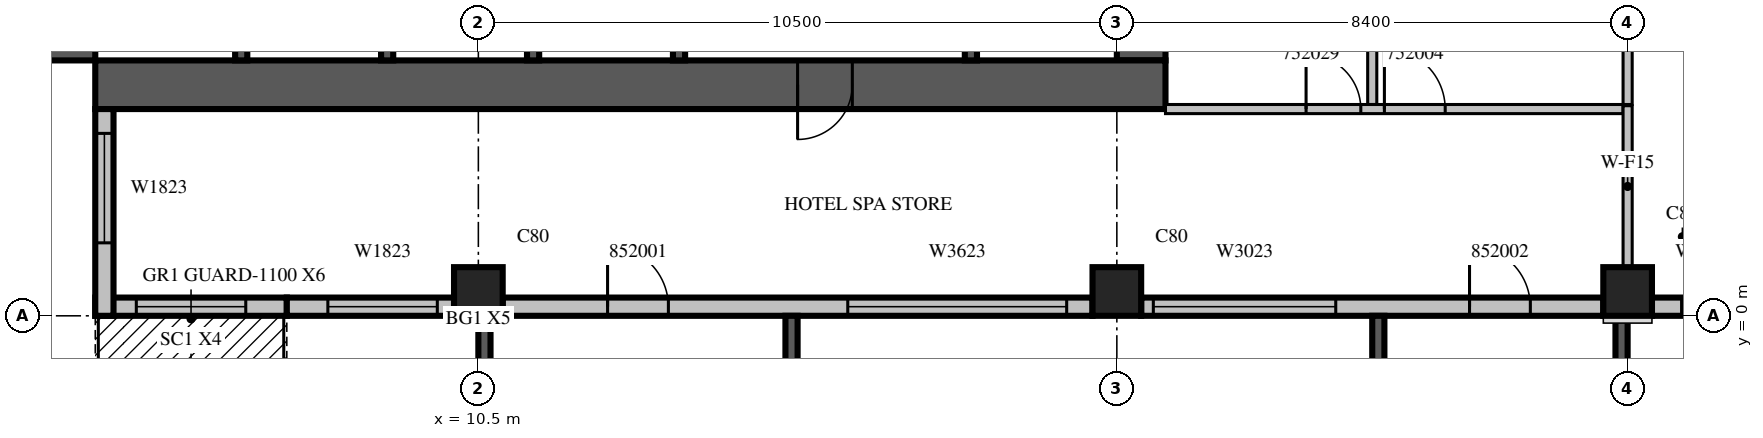
"""IFC4 building model, lengths in metres.
Left out: names, types, materials, properties, quantities, classifications, styles, units other than length and angle.
Written with IfcOpenShell. Run it as: python <this file> out.ifc"""

import sys

from ifc_helpers import new_model, si_unit, direction, frame, frame_2d, origin, origin_2d, place, context, subcontext, project, spatial, rectangle, extrude, source, transform, mapped, element, fill, save


model = new_model("IFC4")
c1 = context("Model", 3, precision=1e-05, world=origin(), true_north=direction((0.0, 1.0)))
c2 = subcontext(c1, "Body", "Model", "MODEL_VIEW")
j1 = project(units=[si_unit("LENGTHUNIT", "METRE"), si_unit("PLANEANGLEUNIT", "RADIAN")], contexts=[c1])
p1 = place(None, origin())
s1 = spatial("IfcSite", under=j1, at=p1, CompositionType="ELEMENT")
p2 = place(p1, origin())
s2 = spatial("IfcBuilding", under=s1, at=p2, CompositionType="ELEMENT")
p3 = place(p2, frame((0.0, 0.0, 231.0)))
s3 = spatial("IfcBuildingStorey", under=s2, at=p3, CompositionType="ELEMENT", Elevation=231.0)
m1 = source(origin(), c2, "Body", "SweptSolid", [
    extrude(rectangle(XDim=0.8, YDim=0.8, at=origin_2d()), origin(), (0.0, 0.0, 1.0), 3.8),
])
for number, where, z_axis, x_axis in (
    (1, (10.5, 0.4, 0.0), (0.0, 0.0, 1.0), (1.0, 0.0, 0.0)),
    (2, (21.0, 0.4, 0.0), (0.0, 0.0, 1.0), (1.0, 0.0, 0.0)),
    (3, (29.4, 0.4, 0.0), (0.0, 0.0, 1.0), (1.0, 0.0, 0.0)),
):
    element("IfcColumn", number, at=place(p3, frame(where, z_axis=z_axis, x_axis=x_axis)), inside=s3, PredefinedType="COLUMN", context=c2, shape_type="MappedRepresentation", body=[
        mapped(m1, transform((0.0, 0.0, 0.0), scale=1.0)),
    ])
m2 = source(origin(), c2, "Body", "SweptSolid", [
    extrude(rectangle(XDim=17.6, YDim=0.8, at=frame_2d((8.8, 0.0))), origin(), (0.0, 0.0, 1.0), 3.8),
])
p4 = place(p3, frame((3.8, 4.2, 0.0), z_axis=(0.0, 0.0, 1.0), x_axis=(0.0, 1.0, 0.0)))
e4 = element("IfcWall", 4, at=p4, inside=s3, PredefinedType="SHEAR", context=c2, shape_type="MappedRepresentation", body=[
    mapped(m2, transform((0.0, 0.0, 0.0), scale=1.0)),
])
m3 = source(origin(), c2, "Body", "SweptSolid", [
    extrude(rectangle(XDim=2.2, YDim=2.1, at=frame_2d((1.1, 1.05))), frame((0.0, 0.41, 0.0), z_axis=(0.0, -1.0, 0.0), x_axis=(1.0, 0.0, 0.0)), (0.0, 0.0, 1.0), 0.82),
])
p5 = place(p4, frame((4.2, 0.0, 0.0)))
e5 = element("IfcOpeningElement", 5, at=p5, cuts=e4, PredefinedType="OPENING", context=c2, shape_type="MappedRepresentation", body=[
    mapped(m3, transform((0.0, 0.0, 0.0), scale=1.0)),
])
m4 = source(origin(), c2, "Body", "SweptSolid", [
    extrude(rectangle(XDim=0.9, YDim=2.1, at=frame_2d((0.45, 1.05))), frame((0.0, 0.41, 0.0), z_axis=(0.0, -1.0, 0.0), x_axis=(1.0, 0.0, 0.0)), (0.0, 0.0, 1.0), 0.82),
])
p6 = place(p4, frame((10.95, 0.0, 0.0)))
e6 = element("IfcOpeningElement", 6, at=p6, cuts=e4, PredefinedType="OPENING", context=c2, shape_type="MappedRepresentation", body=[
    mapped(m4, transform((0.0, 0.0, 0.0), scale=1.0)),
])
m5 = source(origin(), c2, "Body", "SweptSolid", [
    extrude(rectangle(XDim=16.8, YDim=0.8, at=frame_2d((8.4, 0.0))), origin(), (0.0, 0.0, 1.0), 3.8),
])
p7 = place(p3, frame((21.4, 4.2, 0.0), z_axis=(0.0, 0.0, 1.0), x_axis=(0.0, 1.0, 0.0)))
e7 = element("IfcWall", 7, at=p7, inside=s3, PredefinedType="SHEAR", context=c2, shape_type="MappedRepresentation", body=[
    mapped(m5, transform((0.0, 0.0, 0.0), scale=1.0)),
])
p8 = place(p7, frame((4.2, 0.0, 0.0)))
e8 = element("IfcOpeningElement", 8, at=p8, cuts=e7, PredefinedType="OPENING", context=c2, shape_type="MappedRepresentation", body=[
    mapped(m3, transform((0.0, 0.0, 0.0), scale=1.0)),
])
m6 = source(origin(), c2, "Body", "SweptSolid", [
    extrude(rectangle(XDim=1.2, YDim=2.1, at=frame_2d((0.6, 1.05))), frame((0.0, 0.41, 0.0), z_axis=(0.0, -1.0, 0.0), x_axis=(1.0, 0.0, 0.0)), (0.0, 0.0, 1.0), 0.82),
])
p9 = place(p7, frame((14.7, 0.0, 0.0)))
e9 = element("IfcOpeningElement", 9, at=p9, cuts=e7, PredefinedType="OPENING", context=c2, shape_type="MappedRepresentation", body=[
    mapped(m6, transform((0.0, 0.0, 0.0), scale=1.0)),
])
p10 = place(p3, frame((4.2, 3.8, 0.0), z_axis=(0.0, 0.0, 1.0), x_axis=(1.0, 0.0, 0.0)))
e10 = element("IfcWall", 10, at=p10, inside=s3, PredefinedType="SHEAR", context=c2, shape_type="MappedRepresentation", body=[
    mapped(m2, transform((0.0, 0.0, 0.0), scale=1.0)),
])
p11 = place(p10, frame((11.55, 0.0, 0.0)))
e11 = element("IfcOpeningElement", 11, at=p11, cuts=e10, PredefinedType="OPENING", context=c2, shape_type="MappedRepresentation", body=[
    mapped(m4, transform((0.0, 0.0, 0.0), scale=1.0)),
])
m7 = source(origin(), c2, "Body", "SweptSolid", [
    extrude(rectangle(XDim=3.15, YDim=0.3, at=frame_2d((1.575, 0.0))), origin(), (0.0, 0.0, 1.0), 3.4),
])
p12 = place(p3, frame((4.2, 0.15, 0.0), z_axis=(0.0, 0.0, 1.0), x_axis=(1.0, 0.0, 0.0)))
e12 = element("IfcWall", 12, at=p12, inside=s3, PredefinedType="STANDARD", context=c2, shape_type="MappedRepresentation", body=[
    mapped(m7, transform((0.0, 0.0, 0.0), scale=1.0)),
])
m8 = source(origin(), c2, "Body", "SweptSolid", [
    extrude(rectangle(XDim=1.8, YDim=2.4, at=frame_2d((0.9, 1.2))), frame((0.0, 0.16, 0.0), z_axis=(0.0, -1.0, 0.0), x_axis=(1.0, 0.0, 0.0)), (0.0, 0.0, 1.0), 0.32),
])
p13 = place(p12, frame((0.675, 0.0, 0.0)))
e13 = element("IfcOpeningElement", 13, at=p13, cuts=e12, PredefinedType="OPENING", context=c2, shape_type="MappedRepresentation", body=[
    mapped(m8, transform((0.0, 0.0, 0.0), scale=1.0)),
])
p14 = place(p3, frame((7.35, 0.15, 0.0), z_axis=(0.0, 0.0, 1.0), x_axis=(1.0, 0.0, 0.0)))
e14 = element("IfcWall", 14, at=p14, inside=s3, PredefinedType="STANDARD", context=c2, shape_type="SweptSolid", body=[
    extrude(rectangle(XDim=2.75, YDim=0.3, at=frame_2d((1.375, 0.0))), origin(), (0.0, 0.0, 1.0), 3.4),
])
m9 = source(origin(), c2, "Body", "SweptSolid", [
    extrude(rectangle(XDim=1.8, YDim=2.3, at=frame_2d((0.9, 1.15))), frame((0.0, 0.16, 0.0), z_axis=(0.0, -1.0, 0.0), x_axis=(1.0, 0.0, 0.0)), (0.0, 0.0, 1.0), 0.32),
])
p15 = place(p14, frame((0.675, 0.0, 0.6)))
e15 = element("IfcOpeningElement", 15, at=p15, cuts=e14, PredefinedType="OPENING", context=c2, shape_type="MappedRepresentation", body=[
    mapped(m9, transform((0.0, 0.0, 0.0), scale=1.0)),
])
p16 = place(p3, frame((10.9, 0.15, 0.0), z_axis=(0.0, 0.0, 1.0), x_axis=(1.0, 0.0, 0.0)))
e16 = element("IfcWall", 16, at=p16, inside=s3, PredefinedType="STANDARD", context=c2, shape_type="SweptSolid", body=[
    extrude(rectangle(XDim=9.7, YDim=0.3, at=frame_2d((4.85, 0.0))), origin(), (0.0, 0.0, 1.0), 3.4),
])
m10 = source(origin(), c2, "Body", "SweptSolid", [
    extrude(rectangle(XDim=3.6, YDim=2.3, at=frame_2d((1.8, 1.15))), frame((0.0, 0.16, 0.0), z_axis=(0.0, -1.0, 0.0), x_axis=(1.0, 0.0, 0.0)), (0.0, 0.0, 1.0), 0.32),
])
p17 = place(p16, frame((5.675, 0.0, 0.6)))
e17 = element("IfcOpeningElement", 17, at=p17, cuts=e16, PredefinedType="OPENING", context=c2, shape_type="MappedRepresentation", body=[
    mapped(m10, transform((0.0, 0.0, 0.0), scale=1.0)),
])
m11 = source(origin(), c2, "Body", "SweptSolid", [
    extrude(rectangle(XDim=1.0, YDim=2.1, at=frame_2d((0.5, 1.05))), frame((0.0, 0.16, 0.0), z_axis=(0.0, -1.0, 0.0), x_axis=(1.0, 0.0, 0.0)), (0.0, 0.0, 1.0), 0.32),
])
p18 = place(p16, frame((1.725, 0.0, 0.0)))
e18 = element("IfcOpeningElement", 18, at=p18, cuts=e16, PredefinedType="OPENING", context=c2, shape_type="MappedRepresentation", body=[
    mapped(m11, transform((0.0, 0.0, 0.0), scale=1.0)),
])
m12 = source(origin(), c2, "Body", "SweptSolid", [
    extrude(rectangle(XDim=7.6, YDim=0.3, at=frame_2d((3.8, 0.0))), origin(), (0.0, 0.0, 1.0), 3.4),
])
p19 = place(p3, frame((21.4, 0.15, 0.0), z_axis=(0.0, 0.0, 1.0), x_axis=(1.0, 0.0, 0.0)))
e19 = element("IfcWall", 19, at=p19, inside=s3, PredefinedType="STANDARD", context=c2, shape_type="MappedRepresentation", body=[
    mapped(m12, transform((0.0, 0.0, 0.0), scale=1.0)),
])
m13 = source(origin(), c2, "Body", "SweptSolid", [
    extrude(rectangle(XDim=3.0, YDim=2.3, at=frame_2d((1.5, 1.15))), frame((0.0, 0.16, 0.0), z_axis=(0.0, -1.0, 0.0), x_axis=(1.0, 0.0, 0.0)), (0.0, 0.0, 1.0), 0.32),
])
p20 = place(p19, frame((0.2, 0.0, 0.6)))
e20 = element("IfcOpeningElement", 20, at=p20, cuts=e19, PredefinedType="OPENING", context=c2, shape_type="MappedRepresentation", body=[
    mapped(m13, transform((0.0, 0.0, 0.0), scale=1.0)),
])
p21 = place(p19, frame((5.4, 0.0, 0.0)))
e21 = element("IfcOpeningElement", 21, at=p21, cuts=e19, PredefinedType="OPENING", context=c2, shape_type="MappedRepresentation", body=[
    mapped(m11, transform((0.0, 0.0, 0.0), scale=1.0)),
])
p22 = place(p3, frame((29.8, 0.15, 0.0), z_axis=(0.0, 0.0, 1.0), x_axis=(1.0, 0.0, 0.0)))
e22 = element("IfcWall", 22, at=p22, inside=s3, PredefinedType="STANDARD", context=c2, shape_type="MappedRepresentation", body=[
    mapped(m12, transform((0.0, 0.0, 0.0), scale=1.0)),
])
m14 = source(origin(), c2, "Body", "SweptSolid", [
    extrude(rectangle(XDim=1.2, YDim=2.3, at=frame_2d((0.6, 1.15))), frame((0.0, 0.16, 0.0), z_axis=(0.0, -1.0, 0.0), x_axis=(1.0, 0.0, 0.0)), (0.0, 0.0, 1.0), 0.32),
])
p23 = place(p22, frame((0.487, 0.0, 0.6)))
e23 = element("IfcOpeningElement", 23, at=p23, cuts=e22, PredefinedType="OPENING", context=c2, shape_type="MappedRepresentation", body=[
    mapped(m14, transform((0.0, 0.0, 0.0), scale=1.0)),
])
p24 = place(p22, frame((6.013, 0.0, 0.6)))
e24 = element("IfcOpeningElement", 24, at=p24, cuts=e22, PredefinedType="OPENING", context=c2, shape_type="MappedRepresentation", body=[
    mapped(m14, transform((0.0, 0.0, 0.0), scale=1.0)),
])
m15 = source(origin(), c2, "Body", "SweptSolid", [
    extrude(rectangle(XDim=2.4, YDim=2.3, at=frame_2d((1.2, 1.15))), frame((0.0, 0.16, 0.0), z_axis=(0.0, -1.0, 0.0), x_axis=(1.0, 0.0, 0.0)), (0.0, 0.0, 1.0), 0.32),
])
p25 = place(p22, frame((2.65, 0.0, 0.6)))
e25 = element("IfcOpeningElement", 25, at=p25, cuts=e22, PredefinedType="OPENING", context=c2, shape_type="MappedRepresentation", body=[
    mapped(m15, transform((0.0, 0.0, 0.0), scale=1.0)),
])
m16 = source(origin(), c2, "Body", "SweptSolid", [
    extrude(rectangle(XDim=3.4, YDim=0.3, at=frame_2d((1.7, 0.0))), origin(), (0.0, 0.0, 1.0), 3.4),
])
p26 = place(p3, frame((4.35, 3.4, 0.0), z_axis=(0.0, 0.0, 1.0), x_axis=(0.0, -1.0, 0.0)))
e26 = element("IfcWall", 26, at=p26, inside=s3, PredefinedType="STANDARD", context=c2, shape_type="MappedRepresentation", body=[
    mapped(m16, transform((0.0, 0.0, 0.0), scale=1.0)),
])
p27 = place(p26, frame((0.4, 0.0, 0.6)))
e27 = element("IfcOpeningElement", 27, at=p27, cuts=e26, PredefinedType="OPENING", context=c2, shape_type="MappedRepresentation", body=[
    mapped(m9, transform((0.0, 0.0, 0.0), scale=1.0)),
])
m17 = source(origin(), c2, "Body", "SweptSolid", [
    extrude(rectangle(XDim=3.9, YDim=0.2, at=frame_2d((1.95, 0.0))), origin(), (0.0, 0.0, 1.0), 3.39),
])
p28 = place(p3, frame((10.6, 0.0, 0.0), z_axis=(0.0, 0.0, 1.0), x_axis=(0.0, -1.0, 0.0)))
e28 = element("IfcWall", 28, at=p28, inside=s3, PredefinedType="SOLIDWALL", context=c2, shape_type="MappedRepresentation", body=[
    mapped(m17, transform((0.0, 0.0, 0.0), scale=1.0)),
])
m18 = source(origin(), c2, "Body", "SweptSolid", [
    extrude(rectangle(XDim=2.4, YDim=2.3, at=frame_2d((1.2, 1.15))), frame((0.0, 0.11, 0.0), z_axis=(0.0, -1.0, 0.0), x_axis=(1.0, 0.0, 0.0)), (0.0, 0.0, 1.0), 0.22),
])
p29 = place(p28, frame((0.75, 0.0, 0.6)))
e29 = element("IfcOpeningElement", 29, at=p29, cuts=e28, PredefinedType="OPENING", context=c2, shape_type="MappedRepresentation", body=[
    mapped(m18, transform((0.0, 0.0, 0.0), scale=1.0)),
])
p30 = place(p3, frame((15.65, 0.0, 0.0), z_axis=(0.0, 0.0, 1.0), x_axis=(0.0, -1.0, 0.0)))
e30 = element("IfcWall", 30, at=p30, inside=s3, PredefinedType="SOLIDWALL", context=c2, shape_type="MappedRepresentation", body=[
    mapped(m17, transform((0.0, 0.0, 0.0), scale=1.0)),
])
p31 = place(p30, frame((0.75, 0.0, 0.6)))
e31 = element("IfcOpeningElement", 31, at=p31, cuts=e30, PredefinedType="OPENING", context=c2, shape_type="MappedRepresentation", body=[
    mapped(m18, transform((0.0, 0.0, 0.0), scale=1.0)),
])
p32 = place(p3, frame((25.3, 0.0, 0.0), z_axis=(0.0, 0.0, 1.0), x_axis=(0.0, -1.0, 0.0)))
e32 = element("IfcWall", 32, at=p32, inside=s3, PredefinedType="SOLIDWALL", context=c2, shape_type="MappedRepresentation", body=[
    mapped(m17, transform((0.0, 0.0, 0.0), scale=1.0)),
])
p33 = place(p32, frame((0.75, 0.0, 0.6)))
e33 = element("IfcOpeningElement", 33, at=p33, cuts=e32, PredefinedType="OPENING", context=c2, shape_type="MappedRepresentation", body=[
    mapped(m18, transform((0.0, 0.0, 0.0), scale=1.0)),
])
p34 = place(p3, frame((29.3, 0.0, 0.0), z_axis=(0.0, 0.0, 1.0), x_axis=(0.0, -1.0, 0.0)))
e34 = element("IfcWall", 34, at=p34, inside=s3, PredefinedType="SOLIDWALL", context=c2, shape_type="MappedRepresentation", body=[
    mapped(m17, transform((0.0, 0.0, 0.0), scale=1.0)),
])
p35 = place(p34, frame((0.75, 0.0, 0.6)))
e35 = element("IfcOpeningElement", 35, at=p35, cuts=e34, PredefinedType="OPENING", context=c2, shape_type="MappedRepresentation", body=[
    mapped(m18, transform((0.0, 0.0, 0.0), scale=1.0)),
])
m19 = source(origin(), c2, "Body", "SweptSolid", [
    extrude(rectangle(XDim=3.1, YDim=0.2, at=frame_2d((1.55, 0.0))), origin(), (0.0, 0.0, 1.0), 3.8),
])
for number, where, z_axis, x_axis in (
    (36, (6.6, 4.2, 0.0), (0.0, 0.0, 1.0), (0.0, 1.0, 0.0)),
    (37, (9.0, 4.2, 0.0), (0.0, 0.0, 1.0), (0.0, 1.0, 0.0)),
    (38, (11.4, 4.2, 0.0), (0.0, 0.0, 1.0), (0.0, 1.0, 0.0)),
):
    element("IfcWall", number, at=place(p3, frame(where, z_axis=z_axis, x_axis=x_axis)), inside=s3, PredefinedType="SOLIDWALL", context=c2, shape_type="MappedRepresentation", body=[
        mapped(m19, transform((0.0, 0.0, 0.0), scale=1.0)),
    ])
m20 = source(origin(), c2, "Body", "SweptSolid", [
    extrude(rectangle(XDim=3.1, YDim=0.2, at=frame_2d((1.55, 0.0))), origin(), (0.0, 0.0, 1.0), 3.4),
])
for number, where, z_axis, x_axis in (
    (39, (13.8, 4.2, 0.0), (0.0, 0.0, 1.0), (0.0, 1.0, 0.0)),
    (40, (18.6, 4.2, 0.0), (0.0, 0.0, 1.0), (0.0, 1.0, 0.0)),
):
    element("IfcWall", number, at=place(p3, frame(where, z_axis=z_axis, x_axis=x_axis)), inside=s3, PredefinedType="SOLIDWALL", context=c2, shape_type="MappedRepresentation", body=[
        mapped(m20, transform((0.0, 0.0, 0.0), scale=1.0)),
    ])
m21 = source(origin(), c2, "Body", "SweptSolid", [
    extrude(rectangle(XDim=11.525, YDim=0.15, at=frame_2d((5.763, 0.0))), origin(), (0.0, 0.0, 1.0), 3.4),
])
p36 = place(p3, frame((25.2, 15.0, 0.0), z_axis=(0.0, 0.0, 1.0), x_axis=(0.0, -1.0, 0.0)))
e41 = element("IfcWall", 41, at=p36, inside=s3, PredefinedType="PARTITIONING", context=c2, shape_type="MappedRepresentation", body=[
    mapped(m21, transform((0.0, 0.0, 0.0), scale=1.0)),
])
m22 = source(origin(), c2, "Body", "SweptSolid", [
    extrude(rectangle(XDim=0.9, YDim=2.1, at=frame_2d((0.45, 1.05))), frame((0.0, 0.085, 0.0), z_axis=(0.0, -1.0, 0.0), x_axis=(1.0, 0.0, 0.0)), (0.0, 0.0, 1.0), 0.17),
])
p37 = place(p36, frame((8.762, 0.0, 0.0)))
e42 = element("IfcOpeningElement", 42, at=p37, cuts=e41, PredefinedType="OPENING", context=c2, shape_type="MappedRepresentation", body=[
    mapped(m22, transform((0.0, 0.0, 0.0), scale=1.0)),
])
p38 = place(p36, frame((2.125, 0.0, 0.0)))
e43 = element("IfcOpeningElement", 43, at=p38, cuts=e41, PredefinedType="OPENING", context=c2, shape_type="MappedRepresentation", body=[
    mapped(m22, transform((0.0, 0.0, 0.0), scale=1.0)),
])
m23 = source(origin(), c2, "Body", "SweptSolid", [
    extrude(rectangle(XDim=6.626, YDim=0.15, at=frame_2d((3.313, 0.0))), origin(), (0.0, 0.0, 1.0), 3.4),
])
p39 = place(p3, frame((29.4, 3.475, 0.0), z_axis=(0.0, 0.0, 1.0), x_axis=(0.0, 1.0, 0.0)))
e44 = element("IfcWall", 44, at=p39, inside=s3, PredefinedType="PARTITIONING", context=c2, shape_type="MappedRepresentation", body=[
    mapped(m23, transform((0.0, 0.0, 0.0), scale=1.0)),
])
m24 = source(origin(), c2, "Body", "SweptSolid", [
    extrude(rectangle(XDim=7.525, YDim=0.15, at=frame_2d((3.763, 0.0))), origin(), (0.0, 0.0, 1.0), 3.4),
])
p40 = place(p3, frame((21.8, 3.4, 0.0), z_axis=(0.0, 0.0, 1.0), x_axis=(1.0, 0.0, 0.0)))
e45 = element("IfcWall", 45, at=p40, inside=s3, PredefinedType="PARTITIONING", context=c2, shape_type="MappedRepresentation", body=[
    mapped(m24, transform((0.0, 0.0, 0.0), scale=1.0)),
])
m25 = source(origin(), c2, "Body", "SweptSolid", [
    extrude(rectangle(XDim=1.0, YDim=2.1, at=frame_2d((0.5, 1.05))), frame((0.0, 0.085, 0.0), z_axis=(0.0, -1.0, 0.0), x_axis=(1.0, 0.0, 0.0)), (0.0, 0.0, 1.0), 0.17),
])
p41 = place(p40, frame((3.6, 0.0, 0.0)))
e46 = element("IfcOpeningElement", 46, at=p41, cuts=e45, PredefinedType="OPENING", context=c2, shape_type="MappedRepresentation", body=[
    mapped(m25, transform((0.0, 0.0, 0.0), scale=1.0)),
])
p42 = place(p40, frame((2.312, 0.0, 0.0)))
e47 = element("IfcOpeningElement", 47, at=p42, cuts=e45, PredefinedType="OPENING", context=c2, shape_type="MappedRepresentation", body=[
    mapped(m22, transform((0.0, 0.0, 0.0), scale=1.0)),
])
m26 = source(origin(), c2, "Body", "SweptSolid", [
    extrude(rectangle(XDim=2.656, YDim=0.15, at=frame_2d((1.328, 0.0))), origin(), (0.0, 0.0, 1.0), 3.4),
])
p43 = place(p3, frame((29.4, 0.799, 0.0), z_axis=(0.0, 0.0, 1.0), x_axis=(0.0, 1.0, 0.0)))
e48 = element("IfcWall", 48, at=p43, inside=s3, PredefinedType="PARTITIONING", context=c2, shape_type="MappedRepresentation", body=[
    mapped(m26, transform((0.0, 0.0, 0.0), scale=1.0)),
])
m27 = source(origin(), c2, "Body", "SweptSolid", [
    extrude(rectangle(XDim=1.8, YDim=2.4, at=frame_2d((0.9, 1.2))), frame((0.0, 0.025, 0.0), z_axis=(0.0, -1.0, 0.0), x_axis=(1.0, 0.0, 0.0)), (0.0, 0.0, 1.0), 0.05),
])
p44 = place(p13, origin())
e49 = element("IfcDoor", 49, at=p44, inside=s3, OperationType="SLIDING_TO_LEFT", PredefinedType="DOOR", context=c2, shape_type="MappedRepresentation", body=[
    mapped(m27, transform((0.0, 0.0, 0.0), scale=1.0)),
])
fill(e13, e49)
m28 = source(origin(), c2, "Body", "SweptSolid", [
    extrude(rectangle(XDim=1.8, YDim=2.3, at=frame_2d((0.9, 1.15))), frame((0.0, 0.03, 0.0), z_axis=(0.0, -1.0, 0.0), x_axis=(1.0, 0.0, 0.0)), (0.0, 0.0, 1.0), 0.06),
])
p45 = place(p15, origin())
e50 = element("IfcWindow", 50, at=p45, inside=s3, PartitioningType="SINGLE_PANEL", PredefinedType="WINDOW", context=c2, shape_type="MappedRepresentation", body=[
    mapped(m28, transform((0.0, 0.0, 0.0), scale=1.0)),
])
fill(e15, e50)
m29 = source(origin(), c2, "Body", "SweptSolid", [
    extrude(rectangle(XDim=3.6, YDim=2.3, at=frame_2d((1.8, 1.15))), frame((0.0, 0.03, 0.0), z_axis=(0.0, -1.0, 0.0), x_axis=(1.0, 0.0, 0.0)), (0.0, 0.0, 1.0), 0.06),
])
p46 = place(p17, origin())
e51 = element("IfcWindow", 51, at=p46, inside=s3, PartitioningType="SINGLE_PANEL", PredefinedType="WINDOW", context=c2, shape_type="MappedRepresentation", body=[
    mapped(m29, transform((0.0, 0.0, 0.0), scale=1.0)),
])
fill(e17, e51)
m30 = source(origin(), c2, "Body", "SweptSolid", [
    extrude(rectangle(XDim=3.0, YDim=2.3, at=frame_2d((1.5, 1.15))), frame((0.0, 0.03, 0.0), z_axis=(0.0, -1.0, 0.0), x_axis=(1.0, 0.0, 0.0)), (0.0, 0.0, 1.0), 0.06),
])
p47 = place(p20, origin())
e52 = element("IfcWindow", 52, at=p47, inside=s3, PartitioningType="SINGLE_PANEL", PredefinedType="WINDOW", context=c2, shape_type="MappedRepresentation", body=[
    mapped(m30, transform((0.0, 0.0, 0.0), scale=1.0)),
])
fill(e20, e52)
m31 = source(origin(), c2, "Body", "SweptSolid", [
    extrude(rectangle(XDim=1.2, YDim=2.3, at=frame_2d((0.6, 1.15))), frame((0.0, 0.03, 0.0), z_axis=(0.0, -1.0, 0.0), x_axis=(1.0, 0.0, 0.0)), (0.0, 0.0, 1.0), 0.06),
])
p48 = place(p23, origin())
e53 = element("IfcWindow", 53, at=p48, inside=s3, PartitioningType="SINGLE_PANEL", PredefinedType="WINDOW", context=c2, shape_type="MappedRepresentation", body=[
    mapped(m31, transform((0.0, 0.0, 0.0), scale=1.0)),
])
fill(e23, e53)
p49 = place(p27, origin())
e54 = element("IfcWindow", 54, at=p49, inside=s3, PartitioningType="SINGLE_PANEL", PredefinedType="WINDOW", context=c2, shape_type="MappedRepresentation", body=[
    mapped(m28, transform((0.0, 0.0, 0.0), scale=1.0)),
])
fill(e27, e54)
m32 = source(origin(), c2, "Body", "SweptSolid", [
    extrude(rectangle(XDim=0.9, YDim=2.1, at=frame_2d((0.45, 1.05))), frame((0.0, 0.025, 0.0), z_axis=(0.0, -1.0, 0.0), x_axis=(1.0, 0.0, 0.0)), (0.0, 0.0, 1.0), 0.05),
])
p50 = place(p11, origin())
e55 = element("IfcDoor", 55, at=p50, inside=s3, OperationType="SINGLE_SWING_RIGHT", PredefinedType="DOOR", context=c2, shape_type="MappedRepresentation", body=[
    mapped(m32, transform((0.0, 0.0, 0.0), scale=1.0)),
])
fill(e11, e55)
m33 = source(origin(), c2, "Body", "SweptSolid", [
    extrude(rectangle(XDim=1.0, YDim=2.1, at=frame_2d((0.5, 1.05))), frame((0.0, 0.025, 0.0), z_axis=(0.0, -1.0, 0.0), x_axis=(1.0, 0.0, 0.0)), (0.0, 0.0, 1.0), 0.05),
])
p51 = place(p41, origin())
e56 = element("IfcDoor", 56, at=p51, inside=s3, OperationType="SINGLE_SWING_LEFT", PredefinedType="DOOR", context=c2, shape_type="MappedRepresentation", body=[
    mapped(m33, transform((0.0, 0.0, 0.0), scale=1.0)),
])
fill(e46, e56)
p52 = place(p42, origin())
e57 = element("IfcDoor", 57, at=p52, inside=s3, OperationType="SINGLE_SWING_LEFT", PredefinedType="DOOR", context=c2, shape_type="MappedRepresentation", body=[
    mapped(m32, transform((0.0, 0.0, 0.0), scale=1.0)),
])
fill(e47, e57)
p53 = place(p18, origin())
e58 = element("IfcDoor", 58, at=p53, inside=s3, OperationType="SINGLE_SWING_LEFT", PredefinedType="DOOR", context=c2, shape_type="MappedRepresentation", body=[
    mapped(m33, transform((0.0, 0.0, 0.0), scale=1.0)),
])
fill(e18, e58)
p54 = place(p21, origin())
e59 = element("IfcDoor", 59, at=p54, inside=s3, OperationType="SINGLE_SWING_LEFT", PredefinedType="DOOR", context=c2, shape_type="MappedRepresentation", body=[
    mapped(m33, transform((0.0, 0.0, 0.0), scale=1.0)),
])
fill(e21, e59)
save(model, sys.argv[1])
